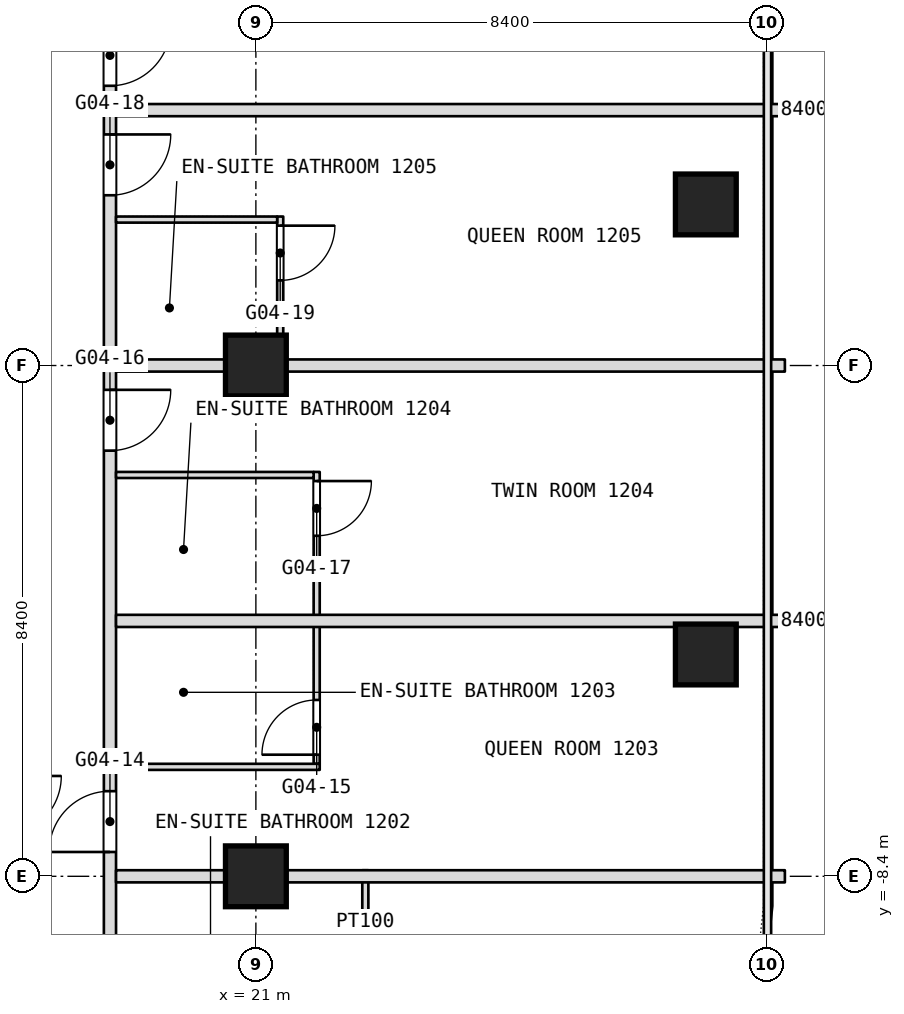
"""IFC4 building model, lengths in metres.
Left out: names, types, materials, properties, quantities, classifications, styles, units other than length and angle.
Written with IfcOpenShell. Run it as: python <this file> out.ifc"""

import sys

from ifc_helpers import new_model, si_unit, direction, frame, frame_2d, origin, origin_2d, place, context, subcontext, project, spatial, rectangle, extrude, element, fill, save


model = new_model("IFC4")
c1 = context("Model", 3, precision=1e-05, world=origin(), true_north=direction((0.0, 1.0)))
c2 = subcontext(c1, "Body", "Model", "MODEL_VIEW")
j1 = project(units=[si_unit("LENGTHUNIT", "METRE"), si_unit("PLANEANGLEUNIT", "RADIAN")], contexts=[c1])
p1 = place(None, origin())
s1 = spatial("IfcSite", under=j1, at=p1, CompositionType="ELEMENT")
p2 = place(p1, origin())
s2 = spatial("IfcBuilding", under=s1, at=p2, CompositionType="ELEMENT")
p3 = place(p2, frame((0.0, 0.0, 58.1)))
s3 = spatial("IfcBuildingStorey", under=s2, at=p3, CompositionType="ELEMENT", Elevation=58.1)
for number, where, z_axis, x_axis in (
    (1, (21.0, -8.4, 0.0), (0.0, 0.0, 1.0), (1.0, 0.0, 0.0)),
    (2, (21.0, 0.0, 0.0), (0.0, 0.0, 1.0), (1.0, 0.0, 0.0)),
    (3, (28.4, 2.649, 0.0), (0.0, 0.0, 1.0), (1.0, 0.0, 0.0)),
    (4, (28.4, -4.752, 0.0), (0.0, 0.0, 1.0), (1.0, 0.0, 0.0)),
):
    element("IfcColumn", number, at=place(p3, frame(where, z_axis=z_axis, x_axis=x_axis)), inside=s3, PredefinedType="COLUMN", context=c2, shape_type="SweptSolid", body=[
        extrude(rectangle(XDim=1.0, YDim=1.0, at=origin_2d()), origin(), (0.0, 0.0, 1.0), 3.6),
    ])
p4 = place(p3, frame((22.8, -10.75, 0.0), z_axis=(0.0, 0.0, 1.0), x_axis=(0.0, 1.0, 0.0)))
e5 = element("IfcWall", 5, at=p4, inside=s3, PredefinedType="PARTITIONING", context=c2, shape_type="SweptSolid", body=[
    extrude(rectangle(XDim=2.45, YDim=0.1, at=frame_2d((1.225, 0.0))), origin(), (0.0, 0.0, 1.0), 3.34),
])
p5 = place(p4, frame((0.15, 0.0, 0.0)))
e6 = element("IfcOpeningElement", 6, at=p5, cuts=e5, PredefinedType="OPENING", context=c2, shape_type="SweptSolid", body=[
    extrude(rectangle(XDim=0.9, YDim=2.1, at=frame_2d((0.45, 1.05))), frame((0.0, 0.05, 0.0), z_axis=(0.0, -1.0, 0.0), x_axis=(1.0, 0.0, 0.0)), (0.0, 0.0, 1.0), 0.1),
])
p6 = place(p3, frame((22.0, -6.55, 0.0), z_axis=(0.0, 0.0, 1.0), x_axis=(0.0, 1.0, 0.0)))
e7 = element("IfcWall", 7, at=p6, inside=s3, PredefinedType="PARTITIONING", context=c2, shape_type="SweptSolid", body=[
    extrude(rectangle(XDim=4.8, YDim=0.1, at=frame_2d((2.4, 0.0))), origin(), (0.0, 0.0, 1.0), 3.34),
])
p7 = place(p6, frame((0.15, 0.0, 0.0)))
e8 = element("IfcOpeningElement", 8, at=p7, cuts=e7, PredefinedType="OPENING", context=c2, shape_type="SweptSolid", body=[
    extrude(rectangle(XDim=0.9, YDim=2.1, at=frame_2d((0.45, 1.05))), frame((0.0, 0.05, 0.0), z_axis=(0.0, -1.0, 0.0), x_axis=(1.0, 0.0, 0.0)), (0.0, 0.0, 1.0), 0.1),
])
p8 = place(p6, frame((3.75, 0.0, 0.0)))
e9 = element("IfcOpeningElement", 9, at=p8, cuts=e7, PredefinedType="OPENING", context=c2, shape_type="SweptSolid", body=[
    extrude(rectangle(XDim=0.9, YDim=2.1, at=frame_2d((0.45, 1.05))), frame((0.0, 0.05, 0.0), z_axis=(0.0, -1.0, 0.0), x_axis=(1.0, 0.0, 0.0)), (0.0, 0.0, 1.0), 0.1),
])
p9 = place(p3, frame((21.4, 0.1, 0.0), z_axis=(0.0, 0.0, 1.0), x_axis=(0.0, 1.0, 0.0)))
e10 = element("IfcWall", 10, at=p9, inside=s3, PredefinedType="PARTITIONING", context=c2, shape_type="SweptSolid", body=[
    extrude(rectangle(XDim=2.35, YDim=0.1, at=frame_2d((1.175, 0.0))), origin(), (0.0, 0.0, 1.0), 3.34),
])
p10 = place(p9, frame((1.3, 0.0, 0.0)))
e11 = element("IfcOpeningElement", 11, at=p10, cuts=e10, PredefinedType="OPENING", context=c2, shape_type="SweptSolid", body=[
    extrude(rectangle(XDim=0.9, YDim=2.1, at=frame_2d((0.45, 1.05))), frame((0.0, 0.05, 0.0), z_axis=(0.0, -1.0, 0.0), x_axis=(1.0, 0.0, 0.0)), (0.0, 0.0, 1.0), 0.1),
])
p11 = place(p3, frame((18.6, -16.665, 0.0), z_axis=(0.0, 0.0, 1.0), x_axis=(0.0, 1.0, 0.0)))
e12 = element("IfcWall", 12, at=p11, inside=s3, PredefinedType="PARTITIONING", context=c2, shape_type="SweptSolid", body=[
    extrude(rectangle(XDim=50.205, YDim=0.2, at=frame_2d((25.103, 0.0))), origin(), (0.0, 0.0, 1.0), 3.34),
])
p12 = place(p11, frame((2.991, 0.0, 0.0)))
e13 = element("IfcOpeningElement", 13, at=p12, cuts=e12, PredefinedType="OPENING", context=c2, shape_type="SweptSolid", body=[
    extrude(rectangle(XDim=1.0, YDim=2.1, at=frame_2d((0.5, 1.05))), frame((0.0, 0.1, 0.0), z_axis=(0.0, -1.0, 0.0), x_axis=(1.0, 0.0, 0.0)), (0.0, 0.0, 1.0), 0.2),
])
p13 = place(p11, frame((4.574, 0.0, 0.0)))
e14 = element("IfcOpeningElement", 14, at=p13, cuts=e12, PredefinedType="OPENING", context=c2, shape_type="SweptSolid", body=[
    extrude(rectangle(XDim=1.0, YDim=2.1, at=frame_2d((0.5, 1.05))), frame((0.0, 0.1, 0.0), z_axis=(0.0, -1.0, 0.0), x_axis=(1.0, 0.0, 0.0)), (0.0, 0.0, 1.0), 0.2),
])
p14 = place(p11, frame((8.665, 0.0, 0.0)))
e15 = element("IfcOpeningElement", 15, at=p14, cuts=e12, PredefinedType="OPENING", context=c2, shape_type="SweptSolid", body=[
    extrude(rectangle(XDim=1.0, YDim=2.1, at=frame_2d((0.5, 1.05))), frame((0.0, 0.1, 0.0), z_axis=(0.0, -1.0, 0.0), x_axis=(1.0, 0.0, 0.0)), (0.0, 0.0, 1.0), 0.2),
])
p15 = place(p11, frame((15.265, 0.0, 0.0)))
e16 = element("IfcOpeningElement", 16, at=p15, cuts=e12, PredefinedType="OPENING", context=c2, shape_type="SweptSolid", body=[
    extrude(rectangle(XDim=1.0, YDim=2.1, at=frame_2d((0.5, 1.05))), frame((0.0, 0.1, 0.0), z_axis=(0.0, -1.0, 0.0), x_axis=(1.0, 0.0, 0.0)), (0.0, 0.0, 1.0), 0.2),
])
p16 = place(p11, frame((19.465, 0.0, 0.0)))
e17 = element("IfcOpeningElement", 17, at=p16, cuts=e12, PredefinedType="OPENING", context=c2, shape_type="SweptSolid", body=[
    extrude(rectangle(XDim=1.0, YDim=2.1, at=frame_2d((0.5, 1.05))), frame((0.0, 0.1, 0.0), z_axis=(0.0, -1.0, 0.0), x_axis=(1.0, 0.0, 0.0)), (0.0, 0.0, 1.0), 0.2),
])
p17 = place(p11, frame((21.265, 0.0, 0.0)))
e18 = element("IfcOpeningElement", 18, at=p17, cuts=e12, PredefinedType="OPENING", context=c2, shape_type="SweptSolid", body=[
    extrude(rectangle(XDim=1.0, YDim=2.1, at=frame_2d((0.5, 1.05))), frame((0.0, 0.1, 0.0), z_axis=(0.0, -1.0, 0.0), x_axis=(1.0, 0.0, 0.0)), (0.0, 0.0, 1.0), 0.2),
])
p18 = place(p11, frame((28.365, 0.0, 0.0)))
e19 = element("IfcOpeningElement", 19, at=p18, cuts=e12, PredefinedType="OPENING", context=c2, shape_type="SweptSolid", body=[
    extrude(rectangle(XDim=1.8, YDim=2.1, at=frame_2d((0.9, 1.05))), frame((0.0, 0.1, 0.0), z_axis=(0.0, -1.0, 0.0), x_axis=(1.0, 0.0, 0.0)), (0.0, 0.0, 1.0), 0.2),
])
p19 = place(p11, frame((37.165, 0.0, 0.0)))
e20 = element("IfcOpeningElement", 20, at=p19, cuts=e12, PredefinedType="OPENING", context=c2, shape_type="SweptSolid", body=[
    extrude(rectangle(XDim=1.1, YDim=2.1, at=frame_2d((0.55, 1.05))), frame((0.0, 0.1, 0.0), z_axis=(0.0, -1.0, 0.0), x_axis=(1.0, 0.0, 0.0)), (0.0, 0.0, 1.0), 0.2),
])
p20 = place(p11, frame((43.415, 0.0, 0.0)))
e21 = element("IfcOpeningElement", 21, at=p20, cuts=e12, PredefinedType="OPENING", context=c2, shape_type="SweptSolid", body=[
    extrude(rectangle(XDim=1.1, YDim=2.1, at=frame_2d((0.55, 1.05))), frame((0.0, 0.1, 0.0), z_axis=(0.0, -1.0, 0.0), x_axis=(1.0, 0.0, 0.0)), (0.0, 0.0, 1.0), 0.2),
])
p21 = place(p3, frame((18.7, -8.4, 0.0), z_axis=(0.0, 0.0, 1.0), x_axis=(1.0, 0.0, 0.0)))
e22 = element("IfcWall", 22, at=p21, inside=s3, PredefinedType="PARTITIONING", context=c2, shape_type="SweptSolid", body=[
    extrude(rectangle(XDim=11.0, YDim=0.2, at=frame_2d((5.5, 0.0))), origin(), (0.0, 0.0, 1.0), 2.84),
])
p22 = place(p3, frame((18.7, -6.6, 0.0), z_axis=(0.0, 0.0, 1.0), x_axis=(1.0, 0.0, 0.0)))
e23 = element("IfcWall", 23, at=p22, inside=s3, PredefinedType="PARTITIONING", context=c2, shape_type="SweptSolid", body=[
    extrude(rectangle(XDim=3.35, YDim=0.1, at=frame_2d((1.675, 0.0))), origin(), (0.0, 0.0, 1.0), 3.34),
])
p23 = place(p3, frame((18.7, -4.2, 0.0), z_axis=(0.0, 0.0, 1.0), x_axis=(1.0, 0.0, 0.0)))
e24 = element("IfcWall", 24, at=p23, inside=s3, PredefinedType="PARTITIONING", context=c2, shape_type="SweptSolid", body=[
    extrude(rectangle(XDim=11.0, YDim=0.2, at=frame_2d((5.5, 0.0))), origin(), (0.0, 0.0, 1.0), 3.34),
])
p24 = place(p3, frame((18.7, -1.8, 0.0), z_axis=(0.0, 0.0, 1.0), x_axis=(1.0, 0.0, 0.0)))
e25 = element("IfcWall", 25, at=p24, inside=s3, PredefinedType="PARTITIONING", context=c2, shape_type="SweptSolid", body=[
    extrude(rectangle(XDim=3.25, YDim=0.1, at=frame_2d((1.625, 0.0))), origin(), (0.0, 0.0, 1.0), 3.34),
])
p25 = place(p3, frame((18.7, 0.0, 0.0), z_axis=(0.0, 0.0, 1.0), x_axis=(1.0, 0.0, 0.0)))
e26 = element("IfcWall", 26, at=p25, inside=s3, PredefinedType="PARTITIONING", context=c2, shape_type="SweptSolid", body=[
    extrude(rectangle(XDim=11.0, YDim=0.2, at=frame_2d((5.5, 0.0))), origin(), (0.0, 0.0, 1.0), 2.84),
])
p26 = place(p3, frame((18.7, 2.4, 0.0), z_axis=(0.0, 0.0, 1.0), x_axis=(1.0, 0.0, 0.0)))
e27 = element("IfcWall", 27, at=p26, inside=s3, PredefinedType="PARTITIONING", context=c2, shape_type="SweptSolid", body=[
    extrude(rectangle(XDim=2.65, YDim=0.1, at=frame_2d((1.325, 0.0))), origin(), (0.0, 0.0, 1.0), 3.34),
])
p27 = place(p3, frame((18.7, 4.2, 0.0), z_axis=(0.0, 0.0, 1.0), x_axis=(1.0, 0.0, 0.0)))
e28 = element("IfcWall", 28, at=p27, inside=s3, PredefinedType="PARTITIONING", context=c2, shape_type="SweptSolid", body=[
    extrude(rectangle(XDim=11.0, YDim=0.2, at=frame_2d((5.5, 0.0))), origin(), (0.0, 0.0, 1.0), 3.34),
])
p28 = place(p7, origin())
e29 = element("IfcDoor", 29, at=p28, inside=s3, OperationType="SINGLE_SWING_LEFT", PredefinedType="DOOR", context=c2, shape_type="SweptSolid", body=[
    extrude(rectangle(XDim=0.9, YDim=2.1, at=frame_2d((0.45, 1.05))), frame((0.0, 0.025, 0.0), z_axis=(0.0, -1.0, 0.0), x_axis=(1.0, 0.0, 0.0)), (0.0, 0.0, 1.0), 0.05),
])
fill(e8, e29)
p29 = place(p8, origin())
e30 = element("IfcDoor", 30, at=p29, inside=s3, OperationType="SINGLE_SWING_RIGHT", PredefinedType="DOOR", context=c2, shape_type="SweptSolid", body=[
    extrude(rectangle(XDim=0.9, YDim=2.1, at=frame_2d((0.45, 1.05))), frame((0.0, 0.025, 0.0), z_axis=(0.0, -1.0, 0.0), x_axis=(1.0, 0.0, 0.0)), (0.0, 0.0, 1.0), 0.05),
])
fill(e9, e30)
p30 = place(p10, origin())
e31 = element("IfcDoor", 31, at=p30, inside=s3, OperationType="SINGLE_SWING_RIGHT", PredefinedType="DOOR", context=c2, shape_type="SweptSolid", body=[
    extrude(rectangle(XDim=0.9, YDim=2.1, at=frame_2d((0.45, 1.05))), frame((0.0, 0.025, 0.0), z_axis=(0.0, -1.0, 0.0), x_axis=(1.0, 0.0, 0.0)), (0.0, 0.0, 1.0), 0.05),
])
fill(e11, e31)
p31 = place(p14, origin())
e32 = element("IfcDoor", 32, at=p31, inside=s3, OperationType="SINGLE_SWING_RIGHT", PredefinedType="DOOR", context=c2, shape_type="SweptSolid", body=[
    extrude(rectangle(XDim=1.0, YDim=2.1, at=frame_2d((0.5, 1.05))), frame((0.0, 0.025, 0.0), z_axis=(0.0, -1.0, 0.0), x_axis=(1.0, 0.0, 0.0)), (0.0, 0.0, 1.0), 0.05),
])
fill(e15, e32)
p32 = place(p15, origin())
e33 = element("IfcDoor", 33, at=p32, inside=s3, OperationType="SINGLE_SWING_RIGHT", PredefinedType="DOOR", context=c2, shape_type="SweptSolid", body=[
    extrude(rectangle(XDim=1.0, YDim=2.1, at=frame_2d((0.5, 1.05))), frame((0.0, 0.025, 0.0), z_axis=(0.0, -1.0, 0.0), x_axis=(1.0, 0.0, 0.0)), (0.0, 0.0, 1.0), 0.05),
])
fill(e16, e33)
p33 = place(p16, origin())
e34 = element("IfcDoor", 34, at=p33, inside=s3, OperationType="SINGLE_SWING_RIGHT", PredefinedType="DOOR", context=c2, shape_type="SweptSolid", body=[
    extrude(rectangle(XDim=1.0, YDim=2.1, at=frame_2d((0.5, 1.05))), frame((0.0, 0.025, 0.0), z_axis=(0.0, -1.0, 0.0), x_axis=(1.0, 0.0, 0.0)), (0.0, 0.0, 1.0), 0.05),
])
fill(e17, e34)
p34 = place(p17, origin())
e35 = element("IfcDoor", 35, at=p34, inside=s3, OperationType="SINGLE_SWING_RIGHT", PredefinedType="DOOR", context=c2, shape_type="SweptSolid", body=[
    extrude(rectangle(XDim=1.0, YDim=2.1, at=frame_2d((0.5, 1.05))), frame((0.0, 0.025, 0.0), z_axis=(0.0, -1.0, 0.0), x_axis=(1.0, 0.0, 0.0)), (0.0, 0.0, 1.0), 0.05),
])
fill(e18, e35)
save(model, sys.argv[1])
